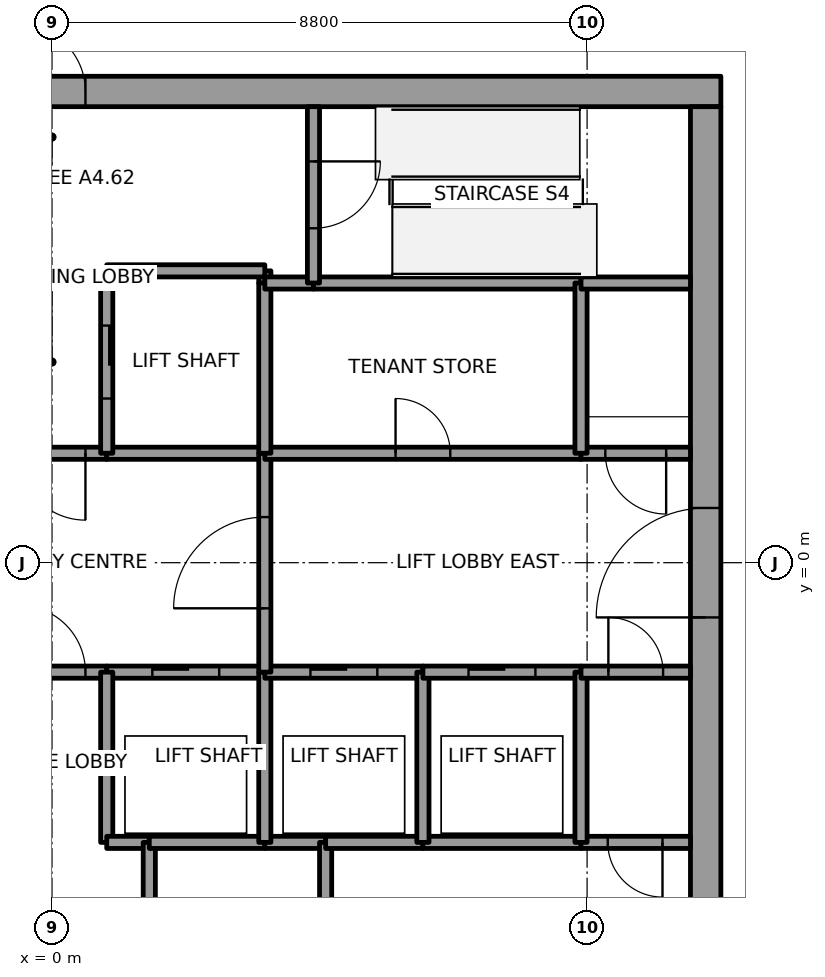
"""IFC4 building model, lengths in metres.
Left out: names, types, materials, properties, quantities, classifications, styles, units other than length and angle.
Written with IfcOpenShell. Run it as: python <this file> out.ifc"""

import sys

from ifc_helpers import new_model, si_unit, direction, frame, frame_2d, origin, place, context, subcontext, project, spatial, rectangle, extrude, element, fill, save


model = new_model("IFC4")
c1 = context("Model", 3, precision=1e-05, world=origin(), true_north=direction((0.0, 1.0)))
c2 = subcontext(c1, "Body", "Model", "MODEL_VIEW")
j1 = project(units=[si_unit("LENGTHUNIT", "METRE"), si_unit("PLANEANGLEUNIT", "RADIAN")], contexts=[c1])
p1 = place(None, origin())
s1 = spatial("IfcSite", under=j1, at=p1, CompositionType="ELEMENT")
p2 = place(p1, origin())
s2 = spatial("IfcBuilding", under=s1, at=p2, CompositionType="ELEMENT")
p3 = place(p2, frame((0.0, 0.0, 267.0)))
s3 = spatial("IfcBuildingStorey", under=s2, at=p3, CompositionType="ELEMENT", Elevation=267.0)
p4 = place(p3, frame((-11.0, 7.75, 0.0), z_axis=(0.0, 0.0, 1.0), x_axis=(1.0, 0.0, 0.0)))
e1 = element("IfcWall", 1, at=p4, inside=s3, PredefinedType="SHEAR", context=c2, shape_type="SweptSolid", body=[
    extrude(rectangle(XDim=22.0, YDim=0.5, at=frame_2d((11.0, 0.0))), origin(), (0.0, 0.0, 1.0), 4.0),
])
p5 = place(p4, frame((10.45, 0.0, 0.0)))
e2 = element("IfcOpeningElement", 2, at=p5, cuts=e1, PredefinedType="OPENING", context=c2, shape_type="SweptSolid", body=[
    extrude(rectangle(XDim=1.1, YDim=2.1, at=frame_2d((0.55, 1.05))), frame((0.0, 0.25, 0.0), z_axis=(0.0, -1.0, 0.0), x_axis=(1.0, 0.0, 0.0)), (0.0, 0.0, 1.0), 0.5),
])
p6 = place(p3, frame((10.75, -7.5, 0.0), z_axis=(0.0, 0.0, 1.0), x_axis=(0.0, 1.0, 0.0)))
e3 = element("IfcWall", 3, at=p6, inside=s3, PredefinedType="SHEAR", context=c2, shape_type="SweptSolid", body=[
    extrude(rectangle(XDim=15.0, YDim=0.5, at=frame_2d((7.5, 0.0))), origin(), (0.0, 0.0, 1.0), 4.0),
])
p7 = place(p6, frame((6.6, 0.0, 0.0)))
e4 = element("IfcOpeningElement", 4, at=p7, cuts=e3, PredefinedType="OPENING", context=c2, shape_type="SweptSolid", body=[
    extrude(rectangle(XDim=1.8, YDim=2.1, at=frame_2d((0.9, 1.05))), frame((0.0, 0.25, 0.0), z_axis=(0.0, -1.0, 0.0), x_axis=(1.0, 0.0, 0.0)), (0.0, 0.0, 1.0), 0.5),
])
p8 = place(p3, frame((-0.9, -1.8, 0.0), z_axis=(0.0, 0.0, 1.0), x_axis=(1.0, 0.0, 0.0)))
e5 = element("IfcWall", 5, at=p8, inside=s3, PredefinedType="SOLIDWALL", context=c2, shape_type="SweptSolid", body=[
    extrude(rectangle(XDim=1.8, YDim=0.2, at=frame_2d((0.9, 0.0))), origin(), (0.0, 0.0, 1.0), 3.85),
])
p9 = place(p8, frame((0.35, 0.0, 0.0)))
e6 = element("IfcOpeningElement", 6, at=p9, cuts=e5, PredefinedType="OPENING", context=c2, shape_type="SweptSolid", body=[
    extrude(rectangle(XDim=1.1, YDim=2.1, at=frame_2d((0.55, 1.05))), frame((0.0, 0.1, 0.0), z_axis=(0.0, -1.0, 0.0), x_axis=(1.0, 0.0, 0.0)), (0.0, 0.0, 1.0), 0.2),
])
p10 = place(p3, frame((0.9, 1.8, 0.0), z_axis=(0.0, 0.0, 1.0), x_axis=(-1.0, 0.0, 0.0)))
e7 = element("IfcWall", 7, at=p10, inside=s3, PredefinedType="SOLIDWALL", context=c2, shape_type="SweptSolid", body=[
    extrude(rectangle(XDim=1.8, YDim=0.2, at=frame_2d((0.9, 0.0))), origin(), (0.0, 0.0, 1.0), 3.85),
])
p11 = place(p10, frame((0.35, 0.0, 0.0)))
e8 = element("IfcOpeningElement", 8, at=p11, cuts=e7, PredefinedType="OPENING", context=c2, shape_type="SweptSolid", body=[
    extrude(rectangle(XDim=1.1, YDim=2.1, at=frame_2d((0.55, 1.05))), frame((0.0, 0.1, 0.0), z_axis=(0.0, -1.0, 0.0), x_axis=(1.0, 0.0, 0.0)), (0.0, 0.0, 1.0), 0.2),
])
p12 = place(p3, frame((0.9, -1.8, 0.0), z_axis=(0.0, 0.0, 1.0), x_axis=(1.0, 0.0, 0.0)))
e9 = element("IfcWall", 9, at=p12, inside=s3, PredefinedType="SOLIDWALL", context=c2, shape_type="SweptSolid", body=[
    extrude(rectangle(XDim=2.6, YDim=0.2, at=frame_2d((1.3, 0.0))), origin(), (0.0, 0.0, 1.0), 3.85),
])
p13 = place(p12, frame((0.75, 0.0, 0.0)))
e10 = element("IfcOpeningElement", 10, at=p13, cuts=e9, PredefinedType="OPENING", context=c2, shape_type="SweptSolid", body=[
    extrude(rectangle(XDim=1.1, YDim=2.1, at=frame_2d((0.55, 1.05))), frame((0.0, 0.1, 0.0), z_axis=(0.0, -1.0, 0.0), x_axis=(1.0, 0.0, 0.0)), (0.0, 0.0, 1.0), 0.2),
])
p14 = place(p3, frame((0.9, -1.8, 0.0), z_axis=(0.0, 0.0, 1.0), x_axis=(0.0, -1.0, 0.0)))
e11 = element("IfcWall", 11, at=p14, inside=s3, PredefinedType="SOLIDWALL", context=c2, shape_type="SweptSolid", body=[
    extrude(rectangle(XDim=2.8, YDim=0.2, at=frame_2d((1.4, 0.0))), origin(), (0.0, 0.0, 1.0), 3.85),
])
p15 = place(p3, frame((0.9, -4.6, 0.0), z_axis=(0.0, 0.0, 1.0), x_axis=(1.0, 0.0, 0.0)))
e12 = element("IfcWall", 12, at=p15, inside=s3, PredefinedType="SOLIDWALL", context=c2, shape_type="SweptSolid", body=[
    extrude(rectangle(XDim=0.7, YDim=0.2, at=frame_2d((0.35, 0.0))), origin(), (0.0, 0.0, 1.0), 3.85),
])
p16 = place(p3, frame((3.5, 1.8, 0.0), z_axis=(0.0, 0.0, 1.0), x_axis=(-1.0, 0.0, 0.0)))
e13 = element("IfcWall", 13, at=p16, inside=s3, PredefinedType="SOLIDWALL", context=c2, shape_type="SweptSolid", body=[
    extrude(rectangle(XDim=2.6, YDim=0.2, at=frame_2d((1.3, 0.0))), origin(), (0.0, 0.0, 1.0), 3.85),
])
p17 = place(p3, frame((3.5, 4.6, 0.0), z_axis=(0.0, 0.0, 1.0), x_axis=(0.0, 1.0, 0.0)))
e14 = element("IfcWall", 14, at=p17, inside=s3, PredefinedType="SOLIDWALL", context=c2, shape_type="SweptSolid", body=[
    extrude(rectangle(XDim=0.2, YDim=0.2, at=frame_2d((0.1, 0.0))), origin(), (0.0, 0.0, 1.0), 3.85),
])
p18 = place(p3, frame((3.5, 4.8, 0.0), z_axis=(0.0, 0.0, 1.0), x_axis=(-1.0, 0.0, 0.0)))
e15 = element("IfcWall", 15, at=p18, inside=s3, PredefinedType="SOLIDWALL", context=c2, shape_type="SweptSolid", body=[
    extrude(rectangle(XDim=2.6, YDim=0.2, at=frame_2d((1.3, 0.0))), origin(), (0.0, 0.0, 1.0), 3.85),
])
p19 = place(p3, frame((0.9, 4.8, 0.0), z_axis=(0.0, 0.0, 1.0), x_axis=(0.0, -1.0, 0.0)))
e16 = element("IfcWall", 16, at=p19, inside=s3, PredefinedType="SOLIDWALL", context=c2, shape_type="SweptSolid", body=[
    extrude(rectangle(XDim=3.0, YDim=0.2, at=frame_2d((1.5, 0.0))), origin(), (0.0, 0.0, 1.0), 3.85),
])
p20 = place(p19, frame((0.9, 0.0, 0.0)))
e17 = element("IfcOpeningElement", 17, at=p20, cuts=e16, PredefinedType="OPENING", context=c2, shape_type="SweptSolid", body=[
    extrude(rectangle(XDim=1.2, YDim=2.1, at=frame_2d((0.6, 1.05))), frame((0.0, 0.1, 0.0), z_axis=(0.0, -1.0, 0.0), x_axis=(1.0, 0.0, 0.0)), (0.0, 0.0, 1.0), 0.2),
])
p21 = place(p3, frame((1.6, -4.6, 0.0), z_axis=(0.0, 0.0, 1.0), x_axis=(0.0, -1.0, 0.0)))
e18 = element("IfcWall", 18, at=p21, inside=s3, PredefinedType="SOLIDWALL", context=c2, shape_type="SweptSolid", body=[
    extrude(rectangle(XDim=2.9, YDim=0.2, at=frame_2d((1.45, 0.0))), origin(), (0.0, 0.0, 1.0), 3.85),
])
p22 = place(p21, frame((1.0, 0.0, 0.0)))
e19 = element("IfcOpeningElement", 19, at=p22, cuts=e18, PredefinedType="OPENING", context=c2, shape_type="SweptSolid", body=[
    extrude(rectangle(XDim=0.9, YDim=2.1, at=frame_2d((0.45, 1.05))), frame((0.0, 0.1, 0.0), z_axis=(0.0, -1.0, 0.0), x_axis=(1.0, 0.0, 0.0)), (0.0, 0.0, 1.0), 0.2),
])
p23 = place(p3, frame((3.5, -4.6, 0.0), z_axis=(0.0, 0.0, 1.0), x_axis=(-1.0, 0.0, 0.0)))
e20 = element("IfcWall", 20, at=p23, inside=s3, PredefinedType="SOLIDWALL", context=c2, shape_type="SweptSolid", body=[
    extrude(rectangle(XDim=1.9, YDim=0.2, at=frame_2d((0.95, 0.0))), origin(), (0.0, 0.0, 1.0), 3.85),
])
p24 = place(p3, frame((4.5, -4.6, 0.0), z_axis=(0.0, 0.0, 1.0), x_axis=(-1.0, 0.0, 0.0)))
e21 = element("IfcWall", 21, at=p24, inside=s3, PredefinedType="SOLIDWALL", context=c2, shape_type="SweptSolid", body=[
    extrude(rectangle(XDim=1.0, YDim=0.2, at=frame_2d((0.5, 0.0))), origin(), (0.0, 0.0, 1.0), 3.85),
])
p25 = place(p3, frame((3.5, -4.6, 0.0), z_axis=(0.0, 0.0, 1.0), x_axis=(0.0, 1.0, 0.0)))
e22 = element("IfcWall", 22, at=p25, inside=s3, PredefinedType="SOLIDWALL", context=c2, shape_type="SweptSolid", body=[
    extrude(rectangle(XDim=2.8, YDim=0.2, at=frame_2d((1.4, 0.0))), origin(), (0.0, 0.0, 1.0), 3.85),
])
p26 = place(p3, frame((3.5, -1.8, 0.0), z_axis=(0.0, 0.0, 1.0), x_axis=(1.0, 0.0, 0.0)))
e23 = element("IfcWall", 23, at=p26, inside=s3, PredefinedType="SOLIDWALL", context=c2, shape_type="SweptSolid", body=[
    extrude(rectangle(XDim=2.6, YDim=0.2, at=frame_2d((1.3, 0.0))), origin(), (0.0, 0.0, 1.0), 3.85),
])
p27 = place(p26, frame((0.75, 0.0, 0.0)))
e24 = element("IfcOpeningElement", 24, at=p27, cuts=e23, PredefinedType="OPENING", context=c2, shape_type="SweptSolid", body=[
    extrude(rectangle(XDim=1.1, YDim=2.1, at=frame_2d((0.55, 1.05))), frame((0.0, 0.1, 0.0), z_axis=(0.0, -1.0, 0.0), x_axis=(1.0, 0.0, 0.0)), (0.0, 0.0, 1.0), 0.2),
])
p28 = place(p3, frame((3.5, -1.8, 0.0), z_axis=(0.0, 0.0, 1.0), x_axis=(0.0, 1.0, 0.0)))
e25 = element("IfcWall", 25, at=p28, inside=s3, PredefinedType="SOLIDWALL", context=c2, shape_type="SweptSolid", body=[
    extrude(rectangle(XDim=3.6, YDim=0.2, at=frame_2d((1.8, 0.0))), origin(), (0.0, 0.0, 1.0), 3.85),
])
p29 = place(p28, frame((1.05, 0.0, 0.0)))
e26 = element("IfcOpeningElement", 26, at=p29, cuts=e25, PredefinedType="OPENING", context=c2, shape_type="SweptSolid", body=[
    extrude(rectangle(XDim=1.5, YDim=2.1, at=frame_2d((0.75, 1.05))), frame((0.0, 0.1, 0.0), z_axis=(0.0, -1.0, 0.0), x_axis=(1.0, 0.0, 0.0)), (0.0, 0.0, 1.0), 0.2),
])
p30 = place(p3, frame((3.5, 1.8, 0.0), z_axis=(0.0, 0.0, 1.0), x_axis=(1.0, 0.0, 0.0)))
e27 = element("IfcWall", 27, at=p30, inside=s3, PredefinedType="SOLIDWALL", context=c2, shape_type="SweptSolid", body=[
    extrude(rectangle(XDim=5.2, YDim=0.2, at=frame_2d((2.6, 0.0))), origin(), (0.0, 0.0, 1.0), 3.85),
])
p31 = place(p30, frame((2.15, 0.0, 0.0)))
e28 = element("IfcOpeningElement", 28, at=p31, cuts=e27, PredefinedType="OPENING", context=c2, shape_type="SweptSolid", body=[
    extrude(rectangle(XDim=0.9, YDim=2.1, at=frame_2d((0.45, 1.05))), frame((0.0, 0.1, 0.0), z_axis=(0.0, -1.0, 0.0), x_axis=(1.0, 0.0, 0.0)), (0.0, 0.0, 1.0), 0.2),
])
p32 = place(p3, frame((3.5, 4.6, 0.0), z_axis=(0.0, 0.0, 1.0), x_axis=(0.0, -1.0, 0.0)))
e29 = element("IfcWall", 29, at=p32, inside=s3, PredefinedType="SOLIDWALL", context=c2, shape_type="SweptSolid", body=[
    extrude(rectangle(XDim=2.8, YDim=0.2, at=frame_2d((1.4, 0.0))), origin(), (0.0, 0.0, 1.0), 3.85),
])
p33 = place(p3, frame((4.3, 4.6, 0.0), z_axis=(0.0, 0.0, 1.0), x_axis=(-1.0, 0.0, 0.0)))
e30 = element("IfcWall", 30, at=p33, inside=s3, PredefinedType="SOLIDWALL", context=c2, shape_type="SweptSolid", body=[
    extrude(rectangle(XDim=0.8, YDim=0.2, at=frame_2d((0.4, 0.0))), origin(), (0.0, 0.0, 1.0), 3.85),
])
p34 = place(p3, frame((8.7, 4.6, 0.0), z_axis=(0.0, 0.0, 1.0), x_axis=(-1.0, 0.0, 0.0)))
e31 = element("IfcWall", 31, at=p34, inside=s3, PredefinedType="SOLIDWALL", context=c2, shape_type="SweptSolid", body=[
    extrude(rectangle(XDim=4.4, YDim=0.2, at=frame_2d((2.2, 0.0))), origin(), (0.0, 0.0, 1.0), 3.85),
])
p35 = place(p3, frame((4.3, 7.5, 0.0), z_axis=(0.0, 0.0, 1.0), x_axis=(0.0, -1.0, 0.0)))
e32 = element("IfcWall", 32, at=p35, inside=s3, PredefinedType="SOLIDWALL", context=c2, shape_type="SweptSolid", body=[
    extrude(rectangle(XDim=2.9, YDim=0.2, at=frame_2d((1.45, 0.0))), origin(), (0.0, 0.0, 1.0), 3.85),
])
p36 = place(p35, frame((0.9, 0.0, 0.0)))
e33 = element("IfcOpeningElement", 33, at=p36, cuts=e32, PredefinedType="OPENING", context=c2, shape_type="SweptSolid", body=[
    extrude(rectangle(XDim=1.1, YDim=2.1, at=frame_2d((0.55, 1.05))), frame((0.0, 0.1, 0.0), z_axis=(0.0, -1.0, 0.0), x_axis=(1.0, 0.0, 0.0)), (0.0, 0.0, 1.0), 0.2),
])
p37 = place(p3, frame((4.5, -4.6, 0.0), z_axis=(0.0, 0.0, 1.0), x_axis=(0.0, -1.0, 0.0)))
e34 = element("IfcWall", 34, at=p37, inside=s3, PredefinedType="SOLIDWALL", context=c2, shape_type="SweptSolid", body=[
    extrude(rectangle(XDim=2.9, YDim=0.2, at=frame_2d((1.45, 0.0))), origin(), (0.0, 0.0, 1.0), 3.85),
])
p38 = place(p3, frame((6.1, -4.6, 0.0), z_axis=(0.0, 0.0, 1.0), x_axis=(-1.0, 0.0, 0.0)))
e35 = element("IfcWall", 35, at=p38, inside=s3, PredefinedType="SOLIDWALL", context=c2, shape_type="SweptSolid", body=[
    extrude(rectangle(XDim=1.6, YDim=0.2, at=frame_2d((0.8, 0.0))), origin(), (0.0, 0.0, 1.0), 3.85),
])
p39 = place(p3, frame((8.7, -4.6, 0.0), z_axis=(0.0, 0.0, 1.0), x_axis=(-1.0, 0.0, 0.0)))
e36 = element("IfcWall", 36, at=p39, inside=s3, PredefinedType="SOLIDWALL", context=c2, shape_type="SweptSolid", body=[
    extrude(rectangle(XDim=2.6, YDim=0.2, at=frame_2d((1.3, 0.0))), origin(), (0.0, 0.0, 1.0), 3.85),
])
p40 = place(p3, frame((6.1, -4.6, 0.0), z_axis=(0.0, 0.0, 1.0), x_axis=(0.0, 1.0, 0.0)))
e37 = element("IfcWall", 37, at=p40, inside=s3, PredefinedType="SOLIDWALL", context=c2, shape_type="SweptSolid", body=[
    extrude(rectangle(XDim=2.8, YDim=0.2, at=frame_2d((1.4, 0.0))), origin(), (0.0, 0.0, 1.0), 3.85),
])
p41 = place(p3, frame((6.1, -1.8, 0.0), z_axis=(0.0, 0.0, 1.0), x_axis=(1.0, 0.0, 0.0)))
e38 = element("IfcWall", 38, at=p41, inside=s3, PredefinedType="SOLIDWALL", context=c2, shape_type="SweptSolid", body=[
    extrude(rectangle(XDim=2.6, YDim=0.2, at=frame_2d((1.3, 0.0))), origin(), (0.0, 0.0, 1.0), 3.85),
])
p42 = place(p41, frame((0.75, 0.0, 0.0)))
e39 = element("IfcOpeningElement", 39, at=p42, cuts=e38, PredefinedType="OPENING", context=c2, shape_type="SweptSolid", body=[
    extrude(rectangle(XDim=1.1, YDim=2.1, at=frame_2d((0.55, 1.05))), frame((0.0, 0.1, 0.0), z_axis=(0.0, -1.0, 0.0), x_axis=(1.0, 0.0, 0.0)), (0.0, 0.0, 1.0), 0.2),
])
p43 = place(p3, frame((10.5, -4.6, 0.0), z_axis=(0.0, 0.0, 1.0), x_axis=(-1.0, 0.0, 0.0)))
e40 = element("IfcWall", 40, at=p43, inside=s3, PredefinedType="SOLIDWALL", context=c2, shape_type="SweptSolid", body=[
    extrude(rectangle(XDim=1.8, YDim=0.2, at=frame_2d((0.9, 0.0))), origin(), (0.0, 0.0, 1.0), 3.85),
])
p44 = place(p43, frame((0.46, 0.0, 0.0)))
e41 = element("IfcOpeningElement", 41, at=p44, cuts=e40, PredefinedType="OPENING", context=c2, shape_type="SweptSolid", body=[
    extrude(rectangle(XDim=0.9, YDim=2.1, at=frame_2d((0.45, 1.05))), frame((0.0, 0.1, 0.0), z_axis=(0.0, -1.0, 0.0), x_axis=(1.0, 0.0, 0.0)), (0.0, 0.0, 1.0), 0.2),
])
p45 = place(p3, frame((8.7, -1.8, 0.0), z_axis=(0.0, 0.0, 1.0), x_axis=(0.0, -1.0, 0.0)))
e42 = element("IfcWall", 42, at=p45, inside=s3, PredefinedType="SOLIDWALL", context=c2, shape_type="SweptSolid", body=[
    extrude(rectangle(XDim=2.8, YDim=0.2, at=frame_2d((1.4, 0.0))), origin(), (0.0, 0.0, 1.0), 3.85),
])
p46 = place(p3, frame((8.7, -1.8, 0.0), z_axis=(0.0, 0.0, 1.0), x_axis=(1.0, 0.0, 0.0)))
e43 = element("IfcWall", 43, at=p46, inside=s3, PredefinedType="SOLIDWALL", context=c2, shape_type="SweptSolid", body=[
    extrude(rectangle(XDim=1.8, YDim=0.2, at=frame_2d((0.9, 0.0))), origin(), (0.0, 0.0, 1.0), 3.85),
])
p47 = place(p46, frame((0.45, 0.0, 0.0)))
e44 = element("IfcOpeningElement", 44, at=p47, cuts=e43, PredefinedType="OPENING", context=c2, shape_type="SweptSolid", body=[
    extrude(rectangle(XDim=0.9, YDim=2.1, at=frame_2d((0.45, 1.05))), frame((0.0, 0.1, 0.0), z_axis=(0.0, -1.0, 0.0), x_axis=(1.0, 0.0, 0.0)), (0.0, 0.0, 1.0), 0.2),
])
p48 = place(p3, frame((10.5, 1.8, 0.0), z_axis=(0.0, 0.0, 1.0), x_axis=(-1.0, 0.0, 0.0)))
e45 = element("IfcWall", 45, at=p48, inside=s3, PredefinedType="SOLIDWALL", context=c2, shape_type="SweptSolid", body=[
    extrude(rectangle(XDim=1.8, YDim=0.2, at=frame_2d((0.9, 0.0))), origin(), (0.0, 0.0, 1.0), 3.85),
])
p49 = place(p48, frame((0.4, 0.0, 0.0)))
e46 = element("IfcOpeningElement", 46, at=p49, cuts=e45, PredefinedType="OPENING", context=c2, shape_type="SweptSolid", body=[
    extrude(rectangle(XDim=1.0, YDim=2.1, at=frame_2d((0.5, 1.05))), frame((0.0, 0.1, 0.0), z_axis=(0.0, -1.0, 0.0), x_axis=(1.0, 0.0, 0.0)), (0.0, 0.0, 1.0), 0.2),
])
p50 = place(p3, frame((8.7, 1.8, 0.0), z_axis=(0.0, 0.0, 1.0), x_axis=(0.0, 1.0, 0.0)))
e47 = element("IfcWall", 47, at=p50, inside=s3, PredefinedType="SOLIDWALL", context=c2, shape_type="SweptSolid", body=[
    extrude(rectangle(XDim=2.8, YDim=0.2, at=frame_2d((1.4, 0.0))), origin(), (0.0, 0.0, 1.0), 3.85),
])
p51 = place(p3, frame((10.5, 4.6, 0.0), z_axis=(0.0, 0.0, 1.0), x_axis=(-1.0, 0.0, 0.0)))
e48 = element("IfcWall", 48, at=p51, inside=s3, PredefinedType="SOLIDWALL", context=c2, shape_type="SweptSolid", body=[
    extrude(rectangle(XDim=1.8, YDim=0.2, at=frame_2d((0.9, 0.0))), origin(), (0.0, 0.0, 1.0), 3.85),
])
p52 = place(p13, origin())
e49 = element("IfcDoor", 49, at=p52, inside=s3, OperationType="SLIDING_TO_RIGHT", PredefinedType="DOOR", context=c2, shape_type="SweptSolid", body=[
    extrude(rectangle(XDim=1.1, YDim=2.1, at=frame_2d((0.55, 1.05))), frame((0.0, 0.025, 0.0), z_axis=(0.0, -1.0, 0.0), x_axis=(1.0, 0.0, 0.0)), (0.0, 0.0, 1.0), 0.05),
])
fill(e10, e49)
p53 = place(p27, origin())
e50 = element("IfcDoor", 50, at=p53, inside=s3, OperationType="SLIDING_TO_LEFT", PredefinedType="DOOR", context=c2, shape_type="SweptSolid", body=[
    extrude(rectangle(XDim=1.1, YDim=2.1, at=frame_2d((0.55, 1.05))), frame((0.0, 0.025, 0.0), z_axis=(0.0, -1.0, 0.0), x_axis=(1.0, 0.0, 0.0)), (0.0, 0.0, 1.0), 0.05),
])
fill(e24, e50)
p54 = place(p42, origin())
e51 = element("IfcDoor", 51, at=p54, inside=s3, OperationType="SLIDING_TO_RIGHT", PredefinedType="DOOR", context=c2, shape_type="SweptSolid", body=[
    extrude(rectangle(XDim=1.1, YDim=2.1, at=frame_2d((0.55, 1.05))), frame((0.0, 0.025, 0.0), z_axis=(0.0, -1.0, 0.0), x_axis=(1.0, 0.0, 0.0)), (0.0, 0.0, 1.0), 0.05),
])
fill(e39, e51)
p55 = place(p20, origin())
e52 = element("IfcDoor", 52, at=p55, inside=s3, OperationType="SLIDING_TO_LEFT", PredefinedType="DOOR", context=c2, shape_type="SweptSolid", body=[
    extrude(rectangle(XDim=1.2, YDim=2.1, at=frame_2d((0.6, 1.05))), frame((0.0, 0.025, 0.0), z_axis=(0.0, -1.0, 0.0), x_axis=(1.0, 0.0, 0.0)), (0.0, 0.0, 1.0), 0.05),
])
fill(e17, e52)
p56 = place(p29, origin())
e53 = element("IfcDoor", 53, at=p56, inside=s3, OperationType="DOUBLE_DOOR_SINGLE_SWING", PredefinedType="DOOR", context=c2, shape_type="SweptSolid", body=[
    extrude(rectangle(XDim=1.5, YDim=2.1, at=frame_2d((0.75, 1.05))), frame((0.0, 0.025, 0.0), z_axis=(0.0, -1.0, 0.0), x_axis=(1.0, 0.0, 0.0)), (0.0, 0.0, 1.0), 0.05),
])
fill(e26, e53)
p57 = place(p11, origin())
e54 = element("IfcDoor", 54, at=p57, inside=s3, OperationType="SINGLE_SWING_LEFT", PredefinedType="DOOR", context=c2, shape_type="SweptSolid", body=[
    extrude(rectangle(XDim=1.1, YDim=2.1, at=frame_2d((0.55, 1.05))), frame((0.0, 0.025, 0.0), z_axis=(0.0, -1.0, 0.0), x_axis=(1.0, 0.0, 0.0)), (0.0, 0.0, 1.0), 0.05),
])
fill(e8, e54)
p58 = place(p9, origin())
e55 = element("IfcDoor", 55, at=p58, inside=s3, OperationType="SINGLE_SWING_LEFT", PredefinedType="DOOR", context=c2, shape_type="SweptSolid", body=[
    extrude(rectangle(XDim=1.1, YDim=2.1, at=frame_2d((0.55, 1.05))), frame((0.0, 0.025, 0.0), z_axis=(0.0, -1.0, 0.0), x_axis=(1.0, 0.0, 0.0)), (0.0, 0.0, 1.0), 0.05),
])
fill(e6, e55)
p59 = place(p49, origin())
e56 = element("IfcDoor", 56, at=p59, inside=s3, OperationType="SINGLE_SWING_RIGHT", PredefinedType="DOOR", context=c2, shape_type="SweptSolid", body=[
    extrude(rectangle(XDim=1.0, YDim=2.1, at=frame_2d((0.5, 1.05))), frame((0.0, 0.025, 0.0), z_axis=(0.0, -1.0, 0.0), x_axis=(1.0, 0.0, 0.0)), (0.0, 0.0, 1.0), 0.05),
])
fill(e46, e56)
p60 = place(p36, origin())
e57 = element("IfcDoor", 57, at=p60, inside=s3, OperationType="SINGLE_SWING_RIGHT", PredefinedType="DOOR", context=c2, shape_type="SweptSolid", body=[
    extrude(rectangle(XDim=1.1, YDim=2.1, at=frame_2d((0.55, 1.05))), frame((0.0, 0.025, 0.0), z_axis=(0.0, -1.0, 0.0), x_axis=(1.0, 0.0, 0.0)), (0.0, 0.0, 1.0), 0.05),
])
fill(e33, e57)
p61 = place(p31, origin())
e58 = element("IfcDoor", 58, at=p61, inside=s3, OperationType="SINGLE_SWING_LEFT", PredefinedType="DOOR", context=c2, shape_type="SweptSolid", body=[
    extrude(rectangle(XDim=0.9, YDim=2.1, at=frame_2d((0.45, 1.05))), frame((0.0, 0.025, 0.0), z_axis=(0.0, -1.0, 0.0), x_axis=(1.0, 0.0, 0.0)), (0.0, 0.0, 1.0), 0.05),
])
fill(e28, e58)
p62 = place(p44, origin())
e59 = element("IfcDoor", 59, at=p62, inside=s3, OperationType="SINGLE_SWING_RIGHT", PredefinedType="DOOR", context=c2, shape_type="SweptSolid", body=[
    extrude(rectangle(XDim=0.9, YDim=2.1, at=frame_2d((0.45, 1.05))), frame((0.0, 0.025, 0.0), z_axis=(0.0, -1.0, 0.0), x_axis=(1.0, 0.0, 0.0)), (0.0, 0.0, 1.0), 0.05),
])
fill(e41, e59)
p63 = place(p47, origin())
e60 = element("IfcDoor", 60, at=p63, inside=s3, OperationType="SINGLE_SWING_LEFT", PredefinedType="DOOR", context=c2, shape_type="SweptSolid", body=[
    extrude(rectangle(XDim=0.9, YDim=2.1, at=frame_2d((0.45, 1.05))), frame((0.0, 0.025, 0.0), z_axis=(0.0, -1.0, 0.0), x_axis=(1.0, 0.0, 0.0)), (0.0, 0.0, 1.0), 0.05),
])
fill(e44, e60)
p64 = place(p7, origin())
e61 = element("IfcDoor", 61, at=p64, inside=s3, OperationType="DOUBLE_DOOR_SINGLE_SWING", PredefinedType="DOOR", context=c2, shape_type="SweptSolid", body=[
    extrude(rectangle(XDim=1.8, YDim=2.1, at=frame_2d((0.9, 1.05))), frame((0.0, 0.025, 0.0), z_axis=(0.0, -1.0, 0.0), x_axis=(1.0, 0.0, 0.0)), (0.0, 0.0, 1.0), 0.05),
])
fill(e4, e61)
p65 = place(p5, origin())
e62 = element("IfcDoor", 62, at=p65, inside=s3, OperationType="SINGLE_SWING_LEFT", PredefinedType="DOOR", context=c2, shape_type="SweptSolid", body=[
    extrude(rectangle(XDim=1.1, YDim=2.1, at=frame_2d((0.55, 1.05))), frame((0.0, 0.025, 0.0), z_axis=(0.0, -1.0, 0.0), x_axis=(1.0, 0.0, 0.0)), (0.0, 0.0, 1.0), 0.05),
])
fill(e2, e62)
save(model, sys.argv[1])
